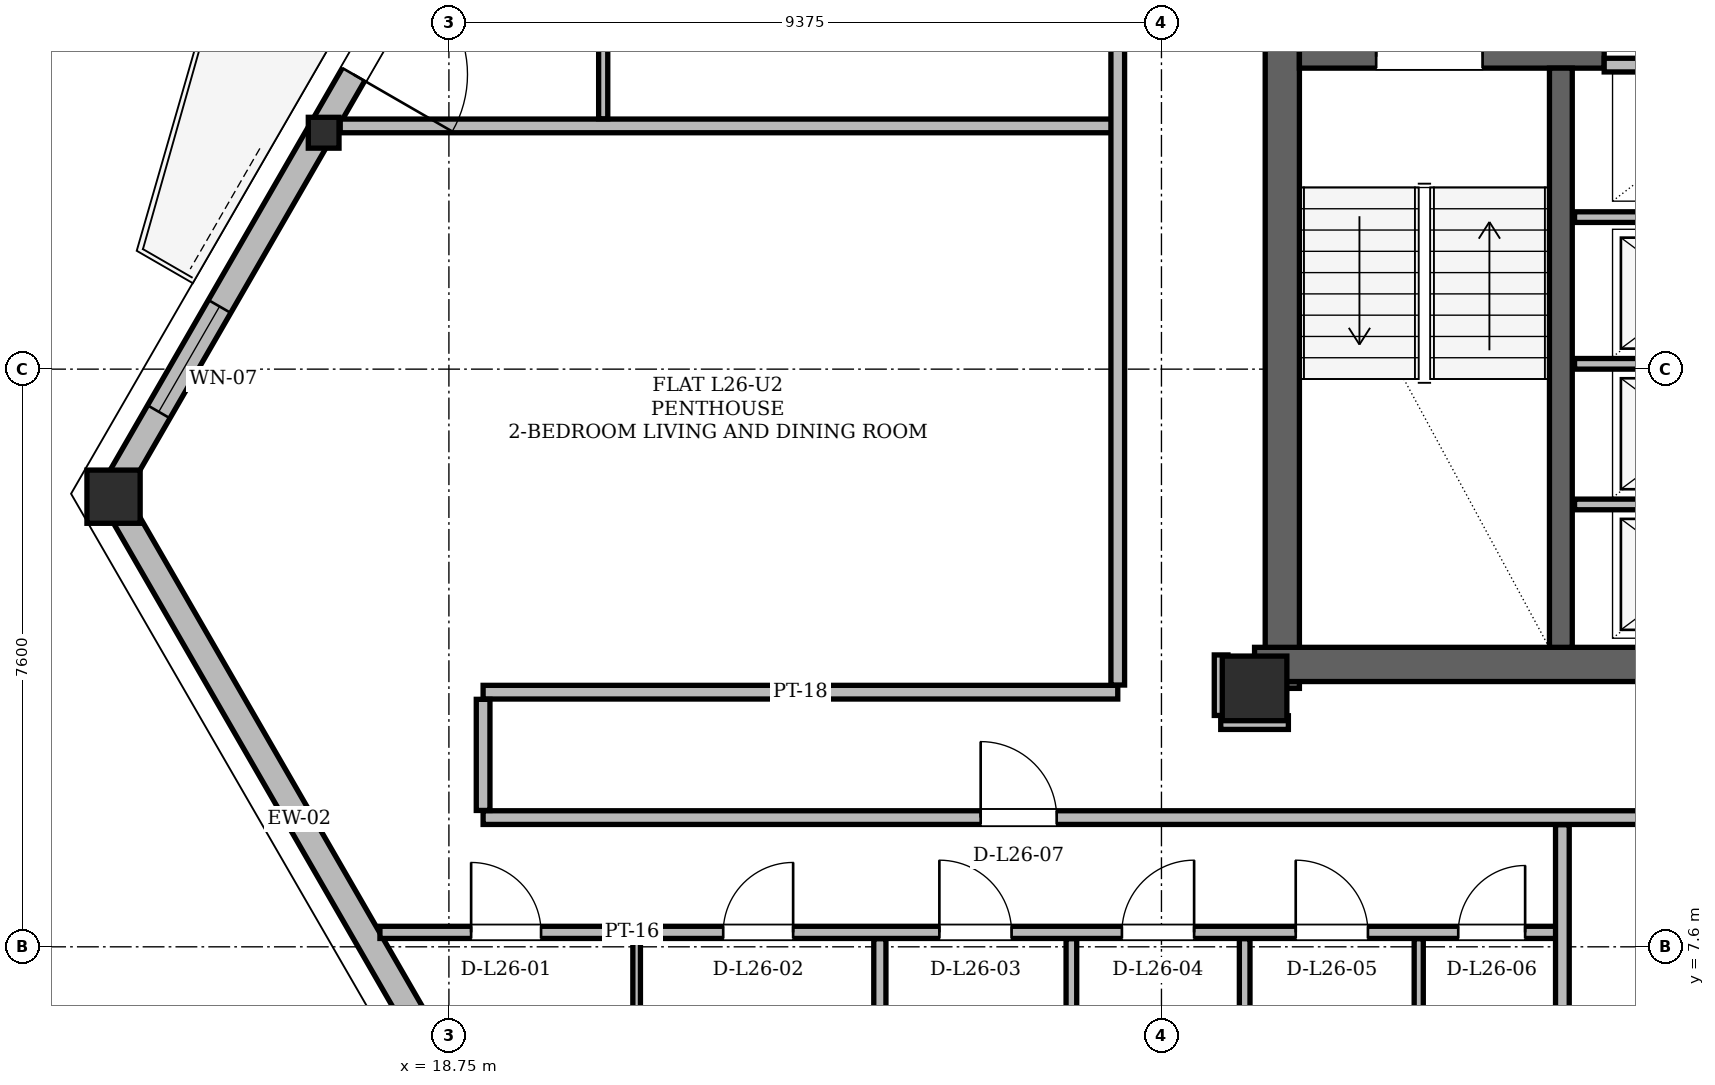
"""IFC4 building model, lengths in metres.
Left out: names, types, materials, properties, quantities, classifications, styles, units other than length and angle.
Written with IfcOpenShell. Run it as: python <this file> out.ifc"""

import sys

from ifc_helpers import new_model, si_unit, direction, frame, frame_2d, origin, origin_2d, place, context, subcontext, project, spatial, rectangle, hollow_rectangle, i_section, extrude, element, fill, save


model = new_model("IFC4")
c1 = context("Model", 3, precision=1e-05, world=origin(), true_north=direction((0.0, 1.0)))
c2 = subcontext(c1, "Body", "Model", "MODEL_VIEW")
j1 = project(units=[si_unit("LENGTHUNIT", "METRE"), si_unit("PLANEANGLEUNIT", "RADIAN")], contexts=[c1])
p1 = place(None, origin())
s1 = spatial("IfcSite", under=j1, at=p1, CompositionType="ELEMENT")
p2 = place(p1, origin())
s2 = spatial("IfcBuilding", under=s1, at=p2, CompositionType="ELEMENT")
p3 = place(p2, frame((0.0, 0.0, 100.5)))
s3 = spatial("IfcBuildingStorey", under=s2, at=p3, CompositionType="ELEMENT", Elevation=100.5)
p4 = place(p3, frame((29.35, 11.0, 0.0), z_axis=(0.0, 0.0, 1.0), x_axis=(1.0, 0.0, 0.0)))
e1 = element("IfcColumn", 1, at=p4, inside=s3, PredefinedType="COLUMN", context=c2, shape_type="SweptSolid", body=[
    extrude(hollow_rectangle(XDim=0.85, YDim=0.85, WallThickness=0.07, at=origin_2d()), origin(), (0.0, 0.0, 1.0), 3.6),
])
p5 = place(p3, frame((14.31, 13.561, 0.004), z_axis=(0.015495232053, -0.021611771021, 0.999646352035), x_axis=(0.812696104859, 0.582687773295, 0.0)))
e2 = element("IfcColumn", 2, at=p5, inside=s3, PredefinedType="COLUMN", context=c2, shape_type="SweptSolid", body=[
    extrude(hollow_rectangle(XDim=0.7, YDim=0.7, WallThickness=0.055, at=origin_2d()), origin(), (0.0, 0.0, 1.0), 3.592),
])
p6 = place(p3, frame((17.071, 18.344, 0.004), z_axis=(0.01726279285, -0.018554104126, 0.999678819023), x_axis=(0.732124530996, 0.681170809059, 0.0)))
e3 = element("IfcColumn", 3, at=p6, inside=s3, PredefinedType="COLUMN", context=c2, shape_type="SweptSolid", body=[
    extrude(i_section(OverallWidth=0.404, OverallDepth=0.406, WebThickness=0.027, FlangeThickness=0.044, at=origin_2d()), origin(), (0.0, 0.0, 1.0), 3.592),
])
p7 = place(p3, frame((29.715, 11.0, 0.0), z_axis=(0.0, 0.0, 1.0), x_axis=(0.0, 1.0, 0.0)))
e4 = element("IfcWall", 4, at=p7, inside=s3, PredefinedType="SHEAR", context=c2, shape_type="SweptSolid", body=[
    extrude(rectangle(XDim=13.3, YDim=0.45, at=frame_2d((6.65, 0.0))), origin(), (0.0, 0.0, 1.0), 3.36),
])
p8 = place(p3, frame((29.35, 11.315, 0.0), z_axis=(0.0, 0.0, 1.0), x_axis=(1.0, 0.0, 0.0)))
e5 = element("IfcWall", 5, at=p8, inside=s3, PredefinedType="SHEAR", context=c2, shape_type="SweptSolid", body=[
    extrude(rectangle(XDim=7.1, YDim=0.45, at=frame_2d((3.55, 0.0))), origin(), (0.0, 0.0, 1.0), 3.36),
])
p9 = place(p3, frame((29.94, 19.31, 0.0), z_axis=(0.0, 0.0, 1.0), x_axis=(1.0, 0.0, 0.0)))
e6 = element("IfcWall", 6, at=p9, inside=s3, PredefinedType="SHEAR", context=c2, shape_type="SweptSolid", body=[
    extrude(rectangle(XDim=4.01, YDim=0.3, at=frame_2d((2.005, 0.0))), origin(), (0.0, 0.0, 1.0), 3.36),
])
p10 = place(p9, frame((1.01, 0.0, 0.0)))
e7 = element("IfcOpeningElement", 7, at=p10, cuts=e6, PredefinedType="OPENING", context=c2, shape_type="SweptSolid", body=[
    extrude(rectangle(XDim=1.4, YDim=2.2, at=frame_2d((0.7, 1.1))), frame((0.0, 0.15, 0.0), z_axis=(0.0, -1.0, 0.0), x_axis=(1.0, 0.0, 0.0)), (0.0, 0.0, 1.0), 0.3),
])
p11 = place(p3, frame((33.38, 11.54, 0.0), z_axis=(0.0, 0.0, 1.0), x_axis=(0.0, 1.0, 0.0)))
e8 = element("IfcWall", 8, at=p11, inside=s3, PredefinedType="SHEAR", context=c2, shape_type="SweptSolid", body=[
    extrude(rectangle(XDim=7.62, YDim=0.3, at=frame_2d((3.81, 0.0))), origin(), (0.0, 0.0, 1.0), 3.36),
])
p12 = place(p3, frame((14.31, 13.561, 0.0), z_axis=(0.0, 0.0, 1.0), x_axis=(0.4999967785, -0.866027263711, 0.0)))
e9 = element("IfcWall", 9, at=p12, inside=s3, PredefinedType="SOLIDWALL", context=c2, shape_type="SweptSolid", body=[
    extrude(rectangle(XDim=11.864, YDim=0.34, at=frame_2d((5.932, 0.0))), origin(), (0.0, 0.0, 1.0), 2.578),
])
p13 = place(p12, frame((10.241, 0.0, 1.28)))
e10 = element("IfcOpeningElement", 10, at=p13, cuts=e9, PredefinedType="OPENING", context=c2, shape_type="SweptSolid", body=[
    extrude(rectangle(XDim=0.85, YDim=0.92, at=frame_2d((0.425, 0.46))), frame((0.0, 0.17, 0.0), z_axis=(0.0, -1.0, 0.0), x_axis=(1.0, 0.0, 0.0)), (0.0, 0.0, 1.0), 0.34),
])
p14 = place(p3, frame((31.568, 43.453, 0.0), z_axis=(0.0, 0.0, 1.0), x_axis=(-0.500002056916, -0.86602421622, 0.0)))
e11 = element("IfcWall", 11, at=p14, inside=s3, PredefinedType="SOLIDWALL", context=c2, shape_type="SweptSolid", body=[
    extrude(rectangle(XDim=34.516, YDim=0.34, at=frame_2d((17.258, 0.0))), origin(), (0.0, 0.0, 1.0), 2.578),
])
p15 = place(p14, frame((8.034, 0.0, 0.0)))
e12 = element("IfcOpeningElement", 12, at=p15, cuts=e11, PredefinedType="OPENING", context=c2, shape_type="SweptSolid", body=[
    extrude(rectangle(XDim=1.5, YDim=2.2, at=frame_2d((0.75, 1.1))), frame((0.0, 0.17, 0.0), z_axis=(0.0, -1.0, 0.0), x_axis=(1.0, 0.0, 0.0)), (0.0, 0.0, 1.0), 0.34),
])
p16 = place(p14, frame((26.647, 0.0, 0.0)))
e13 = element("IfcOpeningElement", 13, at=p16, cuts=e11, PredefinedType="OPENING", context=c2, shape_type="SweptSolid", body=[
    extrude(rectangle(XDim=1.5, YDim=2.2, at=frame_2d((0.75, 1.1))), frame((0.0, 0.17, 0.0), z_axis=(0.0, -1.0, 0.0), x_axis=(1.0, 0.0, 0.0)), (0.0, 0.0, 1.0), 0.34),
])
p17 = place(p14, frame((31.672, 0.0, 0.85)))
e14 = element("IfcOpeningElement", 14, at=p17, cuts=e11, PredefinedType="OPENING", context=c2, shape_type="SweptSolid", body=[
    extrude(rectangle(XDim=1.6, YDim=1.618, at=frame_2d((0.8, 0.809))), frame((0.0, 0.17, 0.0), z_axis=(0.0, -1.0, 0.0), x_axis=(1.0, 0.0, 0.0)), (0.0, 0.0, 1.0), 0.34),
])
p18 = place(p14, frame((11.262, 0.0, 0.85)))
e15 = element("IfcOpeningElement", 15, at=p18, cuts=e11, PredefinedType="OPENING", context=c2, shape_type="SweptSolid", body=[
    extrude(rectangle(XDim=1.8, YDim=1.618, at=frame_2d((0.9, 0.809))), frame((0.0, 0.17, 0.0), z_axis=(0.0, -1.0, 0.0), x_axis=(1.0, 0.0, 0.0)), (0.0, 0.0, 1.0), 0.34),
])
p19 = place(p14, frame((18.602, 0.0, 0.85)))
e16 = element("IfcOpeningElement", 16, at=p19, cuts=e11, PredefinedType="OPENING", context=c2, shape_type="SweptSolid", body=[
    extrude(rectangle(XDim=1.2, YDim=1.48, at=frame_2d((0.6, 0.74))), frame((0.0, 0.17, 0.0), z_axis=(0.0, -1.0, 0.0), x_axis=(1.0, 0.0, 0.0)), (0.0, 0.0, 1.0), 0.34),
])
p20 = place(p14, frame((1.763, 0.0, 0.85)))
e17 = element("IfcOpeningElement", 17, at=p20, cuts=e11, PredefinedType="OPENING", context=c2, shape_type="SweptSolid", body=[
    extrude(rectangle(XDim=1.6, YDim=1.618, at=frame_2d((0.8, 0.809))), frame((0.0, 0.17, 0.0), z_axis=(0.0, -1.0, 0.0), x_axis=(1.0, 0.0, 0.0)), (0.0, 0.0, 1.0), 0.34),
])
p21 = place(p3, frame((33.95, 19.2, 0.0), z_axis=(0.0, 0.0, 1.0), x_axis=(1.0, 0.0, 0.0)))
e18 = element("IfcWall", 18, at=p21, inside=s3, PredefinedType="PARTITIONING", context=c2, shape_type="SweptSolid", body=[
    extrude(rectangle(XDim=2.27, YDim=0.18, at=frame_2d((1.135, 0.0))), origin(), (0.0, 0.0, 1.0), 3.36),
])
for number, where, z_axis, x_axis in (
    (19, (33.56, 13.42, 0.0), (0.0, 0.0, 1.0), (1.0, 0.0, 0.0)),
    (20, (33.56, 15.27, 0.0), (0.0, 0.0, 1.0), (1.0, 0.0, 0.0)),
    (21, (33.56, 17.2, 0.0), (0.0, 0.0, 1.0), (1.0, 0.0, 0.0)),
):
    element("IfcWall", number, at=place(p3, frame(where, z_axis=z_axis, x_axis=x_axis)), inside=s3, PredefinedType="PARTITIONING", context=c2, shape_type="SweptSolid", body=[
        extrude(rectangle(XDim=2.66, YDim=0.14, at=frame_2d((1.33, 0.0))), origin(), (0.0, 0.0, 1.0), 3.36),
    ])
p22 = place(p3, frame((17.842, 7.79, 0.0), z_axis=(0.0, 0.0, 1.0), x_axis=(1.0, 0.0, 0.0)))
e22 = element("IfcWall", 22, at=p22, inside=s3, PredefinedType="PARTITIONING", context=c2, shape_type="SweptSolid", body=[
    extrude(rectangle(XDim=15.608, YDim=0.16, at=frame_2d((7.804, 0.0))), origin(), (0.0, 0.0, 1.0), 2.814),
])
p23 = place(p22, frame((1.2, 0.0, 0.0)))
e23 = element("IfcOpeningElement", 23, at=p23, cuts=e22, PredefinedType="OPENING", context=c2, shape_type="SweptSolid", body=[
    extrude(rectangle(XDim=0.92, YDim=2.12, at=frame_2d((0.46, 1.06))), frame((0.0, 0.08, 0.0), z_axis=(0.0, -1.0, 0.0), x_axis=(1.0, 0.0, 0.0)), (0.0, 0.0, 1.0), 0.16),
])
p24 = place(p22, frame((4.517, 0.0, 0.0)))
e24 = element("IfcOpeningElement", 24, at=p24, cuts=e22, PredefinedType="OPENING", context=c2, shape_type="SweptSolid", body=[
    extrude(rectangle(XDim=0.92, YDim=2.12, at=frame_2d((0.46, 1.06))), frame((0.0, 0.08, 0.0), z_axis=(0.0, -1.0, 0.0), x_axis=(1.0, 0.0, 0.0)), (0.0, 0.0, 1.0), 0.16),
])
p25 = place(p22, frame((7.361, 0.0, 0.0)))
e25 = element("IfcOpeningElement", 25, at=p25, cuts=e22, PredefinedType="OPENING", context=c2, shape_type="SweptSolid", body=[
    extrude(rectangle(XDim=0.95, YDim=2.1, at=frame_2d((0.475, 1.05))), frame((0.0, 0.08, 0.0), z_axis=(0.0, -1.0, 0.0), x_axis=(1.0, 0.0, 0.0)), (0.0, 0.0, 1.0), 0.16),
])
p26 = place(p22, frame((9.762, 0.0, 0.0)))
e26 = element("IfcOpeningElement", 26, at=p26, cuts=e22, PredefinedType="OPENING", context=c2, shape_type="SweptSolid", body=[
    extrude(rectangle(XDim=0.95, YDim=2.1, at=frame_2d((0.475, 1.05))), frame((0.0, 0.08, 0.0), z_axis=(0.0, -1.0, 0.0), x_axis=(1.0, 0.0, 0.0)), (0.0, 0.0, 1.0), 0.16),
])
p27 = place(p22, frame((12.049, 0.0, 0.0)))
e27 = element("IfcOpeningElement", 27, at=p27, cuts=e22, PredefinedType="OPENING", context=c2, shape_type="SweptSolid", body=[
    extrude(rectangle(XDim=0.95, YDim=2.1, at=frame_2d((0.475, 1.05))), frame((0.0, 0.08, 0.0), z_axis=(0.0, -1.0, 0.0), x_axis=(1.0, 0.0, 0.0)), (0.0, 0.0, 1.0), 0.16),
])
p28 = place(p22, frame((14.188, 0.0, 0.0)))
e28 = element("IfcOpeningElement", 28, at=p28, cuts=e22, PredefinedType="OPENING", context=c2, shape_type="SweptSolid", body=[
    extrude(rectangle(XDim=0.88, YDim=2.08, at=frame_2d((0.44, 1.04))), frame((0.0, 0.08, 0.0), z_axis=(0.0, -1.0, 0.0), x_axis=(1.0, 0.0, 0.0)), (0.0, 0.0, 1.0), 0.16),
])
p29 = place(p3, frame((19.2, 9.3, 0.0), z_axis=(0.0, 0.0, 1.0), x_axis=(1.0, 0.0, 0.0)))
e29 = element("IfcWall", 29, at=p29, inside=s3, PredefinedType="PARTITIONING", context=c2, shape_type="SweptSolid", body=[
    extrude(rectangle(XDim=36.6, YDim=0.18, at=frame_2d((18.3, 0.0))), origin(), (0.0, 0.0, 1.0), 2.814),
])
p30 = place(p29, frame((6.546, 0.0, 0.0)))
e30 = element("IfcOpeningElement", 30, at=p30, cuts=e29, PredefinedType="OPENING", context=c2, shape_type="SweptSolid", body=[
    extrude(rectangle(XDim=1.0, YDim=2.18, at=frame_2d((0.5, 1.09))), frame((0.0, 0.09, 0.0), z_axis=(0.0, -1.0, 0.0), x_axis=(1.0, 0.0, 0.0)), (0.0, 0.0, 1.0), 0.18),
])
p31 = place(p29, frame((23.539, 0.0, 0.0)))
e31 = element("IfcOpeningElement", 31, at=p31, cuts=e29, PredefinedType="OPENING", context=c2, shape_type="SweptSolid", body=[
    extrude(rectangle(XDim=1.0, YDim=2.18, at=frame_2d((0.5, 1.09))), frame((0.0, 0.09, 0.0), z_axis=(0.0, -1.0, 0.0), x_axis=(1.0, 0.0, 0.0)), (0.0, 0.0, 1.0), 0.18),
])
p32 = place(p3, frame((28.905, 10.55, 0.0), z_axis=(0.0, 0.0, 1.0), x_axis=(1.0, 0.0, 0.0)))
e32 = element("IfcWall", 32, at=p32, inside=s3, PredefinedType="PARTITIONING", context=c2, shape_type="SweptSolid", body=[
    extrude(rectangle(XDim=0.89, YDim=0.18, at=frame_2d((0.445, 0.0))), origin(), (0.0, 0.0, 1.0), 3.36),
])
p33 = place(p3, frame((19.2, 10.95, 0.0), z_axis=(0.0, 0.0, 1.0), x_axis=(1.0, 0.0, 0.0)))
e33 = element("IfcWall", 33, at=p33, inside=s3, PredefinedType="PARTITIONING", context=c2, shape_type="SweptSolid", body=[
    extrude(rectangle(XDim=8.35, YDim=0.18, at=frame_2d((4.175, 0.0))), origin(), (0.0, 0.0, 1.0), 3.36),
])
p34 = place(p3, frame((17.32, 18.4, 0.0), z_axis=(0.0, 0.0, 1.0), x_axis=(1.0, 0.0, 0.0)))
e34 = element("IfcWall", 34, at=p34, inside=s3, PredefinedType="PARTITIONING", context=c2, shape_type="SweptSolid", body=[
    extrude(rectangle(XDim=10.29, YDim=0.18, at=frame_2d((5.145, 0.0))), origin(), (0.0, 0.0, 1.0), 3.36),
])
p35 = place(p3, frame((19.2, 9.394, 0.0), z_axis=(0.0, 0.0, 1.0), x_axis=(0.0, 1.0, 0.0)))
e35 = element("IfcWall", 35, at=p35, inside=s3, PredefinedType="PARTITIONING", context=c2, shape_type="SweptSolid", body=[
    extrude(rectangle(XDim=1.462, YDim=0.18, at=frame_2d((0.731, 0.0))), origin(), (0.0, 0.0, 1.0), 3.36),
])
p36 = place(p3, frame((20.78, 18.494, 0.0), z_axis=(0.0, 0.0, 1.0), x_axis=(0.0, 1.0, 0.0)))
e36 = element("IfcWall", 36, at=p36, inside=s3, PredefinedType="PARTITIONING", context=c2, shape_type="SweptSolid", body=[
    extrude(rectangle(XDim=5.732, YDim=0.12, at=frame_2d((2.866, 0.0))), origin(), (0.0, 0.0, 1.0), 3.36),
])
p37 = place(p36, frame((2.426, 0.0, 0.0)))
e37 = element("IfcOpeningElement", 37, at=p37, cuts=e36, PredefinedType="OPENING", context=c2, shape_type="SweptSolid", body=[
    extrude(rectangle(XDim=0.88, YDim=2.08, at=frame_2d((0.44, 1.04))), frame((0.0, 0.06, 0.0), z_axis=(0.0, -1.0, 0.0), x_axis=(1.0, 0.0, 0.0)), (0.0, 0.0, 1.0), 0.12),
])
p38 = place(p3, frame((21.22, 3.46, 0.0), z_axis=(0.0, 0.0, 1.0), x_axis=(0.0, 1.0, 0.0)))
e38 = element("IfcWall", 38, at=p38, inside=s3, PredefinedType="PARTITIONING", context=c2, shape_type="SweptSolid", body=[
    extrude(rectangle(XDim=4.246, YDim=0.1, at=frame_2d((2.123, 0.0))), origin(), (0.0, 0.0, 1.0), 2.814),
])
p39 = place(p3, frame((24.42, 3.46, 0.0), z_axis=(0.0, 0.0, 1.0), x_axis=(0.0, 1.0, 0.0)))
e39 = element("IfcWall", 39, at=p39, inside=s3, PredefinedType="PARTITIONING", context=c2, shape_type="SweptSolid", body=[
    extrude(rectangle(XDim=4.246, YDim=0.16, at=frame_2d((2.123, 0.0))), origin(), (0.0, 0.0, 1.0), 2.814),
])
p40 = place(p3, frame((26.94, 3.46, 0.0), z_axis=(0.0, 0.0, 1.0), x_axis=(0.0, 1.0, 0.0)))
e40 = element("IfcWall", 40, at=p40, inside=s3, PredefinedType="PARTITIONING", context=c2, shape_type="SweptSolid", body=[
    extrude(rectangle(XDim=4.246, YDim=0.14, at=frame_2d((2.123, 0.0))), origin(), (0.0, 0.0, 1.0), 2.946),
])
p41 = place(p3, frame((27.55, 11.044, 0.0), z_axis=(0.0, 0.0, 1.0), x_axis=(0.0, 1.0, 0.0)))
e41 = element("IfcWall", 41, at=p41, inside=s3, PredefinedType="PARTITIONING", context=c2, shape_type="SweptSolid", body=[
    extrude(rectangle(XDim=14.832, YDim=0.18, at=frame_2d((7.416, 0.0))), origin(), (0.0, 0.0, 1.0), 2.814),
])
p42 = place(p41, frame((9.795, 0.0, 0.0)))
e42 = element("IfcOpeningElement", 42, at=p42, cuts=e41, PredefinedType="OPENING", context=c2, shape_type="SweptSolid", body=[
    extrude(rectangle(XDim=1.0, YDim=2.18, at=frame_2d((0.5, 1.09))), frame((0.0, 0.09, 0.0), z_axis=(0.0, -1.0, 0.0), x_axis=(1.0, 0.0, 0.0)), (0.0, 0.0, 1.0), 0.18),
])
p43 = place(p3, frame((28.91, 10.644, 0.0), z_axis=(0.0, 0.0, 1.0), x_axis=(0.0, 1.0, 0.0)))
e43 = element("IfcWall", 43, at=p43, inside=s3, PredefinedType="PARTITIONING", context=c2, shape_type="SweptSolid", body=[
    extrude(rectangle(XDim=0.796, YDim=0.18, at=frame_2d((0.398, 0.0))), origin(), (0.0, 0.0, 1.0), 2.814),
])
p44 = place(p3, frame((29.22, 3.46, 0.0), z_axis=(0.0, 0.0, 1.0), x_axis=(0.0, 1.0, 0.0)))
e44 = element("IfcWall", 44, at=p44, inside=s3, PredefinedType="PARTITIONING", context=c2, shape_type="SweptSolid", body=[
    extrude(rectangle(XDim=4.246, YDim=0.14, at=frame_2d((2.123, 0.0))), origin(), (0.0, 0.0, 1.0), 3.36),
])
p45 = place(p3, frame((31.51, 3.46, 0.0), z_axis=(0.0, 0.0, 1.0), x_axis=(0.0, 1.0, 0.0)))
e45 = element("IfcWall", 45, at=p45, inside=s3, PredefinedType="PARTITIONING", context=c2, shape_type="SweptSolid", body=[
    extrude(rectangle(XDim=4.246, YDim=0.12, at=frame_2d((2.123, 0.0))), origin(), (0.0, 0.0, 1.0), 2.946),
])
p46 = place(p3, frame((33.4, 3.46, 0.0), z_axis=(0.0, 0.0, 1.0), x_axis=(0.0, 1.0, 0.0)))
e46 = element("IfcWall", 46, at=p46, inside=s3, PredefinedType="PARTITIONING", context=c2, shape_type="SweptSolid", body=[
    extrude(rectangle(XDim=5.746, YDim=0.18, at=frame_2d((2.873, 0.0))), origin(), (0.0, 0.0, 1.0), 3.36),
])
p47 = place(p16, origin())
e47 = element("IfcDoor", 47, at=p47, inside=s3, OperationType="SINGLE_SWING_RIGHT", PredefinedType="DOOR", context=c2, shape_type="SweptSolid", body=[
    extrude(rectangle(XDim=1.5, YDim=2.2, at=frame_2d((0.75, 1.1))), frame((0.0, 0.025, 0.0), z_axis=(0.0, -1.0, 0.0), x_axis=(1.0, 0.0, 0.0)), (0.0, 0.0, 1.0), 0.05),
])
fill(e13, e47)
p48 = place(p17, origin())
e48 = element("IfcWindow", 48, at=p48, inside=s3, PartitioningType="SINGLE_PANEL", PredefinedType="WINDOW", context=c2, shape_type="SweptSolid", body=[
    extrude(rectangle(XDim=1.6, YDim=1.618, at=frame_2d((0.8, 0.809))), frame((0.0, 0.03, 0.0), z_axis=(0.0, -1.0, 0.0), x_axis=(1.0, 0.0, 0.0)), (0.0, 0.0, 1.0), 0.06),
])
fill(e14, e48)
p49 = place(p10, origin())
e49 = element("IfcDoor", 49, at=p49, inside=s3, OperationType="SINGLE_SWING_LEFT", PredefinedType="DOOR", context=c2, shape_type="SweptSolid", body=[
    extrude(rectangle(XDim=1.4, YDim=2.2, at=frame_2d((0.7, 1.1))), frame((0.0, 0.025, 0.0), z_axis=(0.0, -1.0, 0.0), x_axis=(1.0, 0.0, 0.0)), (0.0, 0.0, 1.0), 0.05),
])
fill(e7, e49)
p50 = place(p23, origin())
e50 = element("IfcDoor", 50, at=p50, inside=s3, OperationType="SINGLE_SWING_LEFT", PredefinedType="DOOR", context=c2, shape_type="SweptSolid", body=[
    extrude(rectangle(XDim=0.92, YDim=2.12, at=frame_2d((0.46, 1.06))), frame((0.0, 0.025, 0.0), z_axis=(0.0, -1.0, 0.0), x_axis=(1.0, 0.0, 0.0)), (0.0, 0.0, 1.0), 0.05),
])
fill(e23, e50)
p51 = place(p24, origin())
e51 = element("IfcDoor", 51, at=p51, inside=s3, OperationType="SINGLE_SWING_RIGHT", PredefinedType="DOOR", context=c2, shape_type="SweptSolid", body=[
    extrude(rectangle(XDim=0.92, YDim=2.12, at=frame_2d((0.46, 1.06))), frame((0.0, 0.025, 0.0), z_axis=(0.0, -1.0, 0.0), x_axis=(1.0, 0.0, 0.0)), (0.0, 0.0, 1.0), 0.05),
])
fill(e24, e51)
p52 = place(p25, origin())
e52 = element("IfcDoor", 52, at=p52, inside=s3, OperationType="SINGLE_SWING_LEFT", PredefinedType="DOOR", context=c2, shape_type="SweptSolid", body=[
    extrude(rectangle(XDim=0.95, YDim=2.1, at=frame_2d((0.475, 1.05))), frame((0.0, 0.025, 0.0), z_axis=(0.0, -1.0, 0.0), x_axis=(1.0, 0.0, 0.0)), (0.0, 0.0, 1.0), 0.05),
])
fill(e25, e52)
p53 = place(p26, origin())
e53 = element("IfcDoor", 53, at=p53, inside=s3, OperationType="SINGLE_SWING_RIGHT", PredefinedType="DOOR", context=c2, shape_type="SweptSolid", body=[
    extrude(rectangle(XDim=0.95, YDim=2.1, at=frame_2d((0.475, 1.05))), frame((0.0, 0.025, 0.0), z_axis=(0.0, -1.0, 0.0), x_axis=(1.0, 0.0, 0.0)), (0.0, 0.0, 1.0), 0.05),
])
fill(e26, e53)
p54 = place(p27, origin())
e54 = element("IfcDoor", 54, at=p54, inside=s3, OperationType="SINGLE_SWING_LEFT", PredefinedType="DOOR", context=c2, shape_type="SweptSolid", body=[
    extrude(rectangle(XDim=0.95, YDim=2.1, at=frame_2d((0.475, 1.05))), frame((0.0, 0.025, 0.0), z_axis=(0.0, -1.0, 0.0), x_axis=(1.0, 0.0, 0.0)), (0.0, 0.0, 1.0), 0.05),
])
fill(e27, e54)
p55 = place(p28, origin())
e55 = element("IfcDoor", 55, at=p55, inside=s3, OperationType="SINGLE_SWING_RIGHT", PredefinedType="DOOR", context=c2, shape_type="SweptSolid", body=[
    extrude(rectangle(XDim=0.88, YDim=2.08, at=frame_2d((0.44, 1.04))), frame((0.0, 0.025, 0.0), z_axis=(0.0, -1.0, 0.0), x_axis=(1.0, 0.0, 0.0)), (0.0, 0.0, 1.0), 0.05),
])
fill(e28, e55)
p56 = place(p30, origin())
e56 = element("IfcDoor", 56, at=p56, inside=s3, OperationType="SINGLE_SWING_LEFT", PredefinedType="DOOR", context=c2, shape_type="SweptSolid", body=[
    extrude(rectangle(XDim=1.0, YDim=2.18, at=frame_2d((0.5, 1.09))), frame((0.0, 0.025, 0.0), z_axis=(0.0, -1.0, 0.0), x_axis=(1.0, 0.0, 0.0)), (0.0, 0.0, 1.0), 0.05),
])
fill(e30, e56)
save(model, sys.argv[1])
